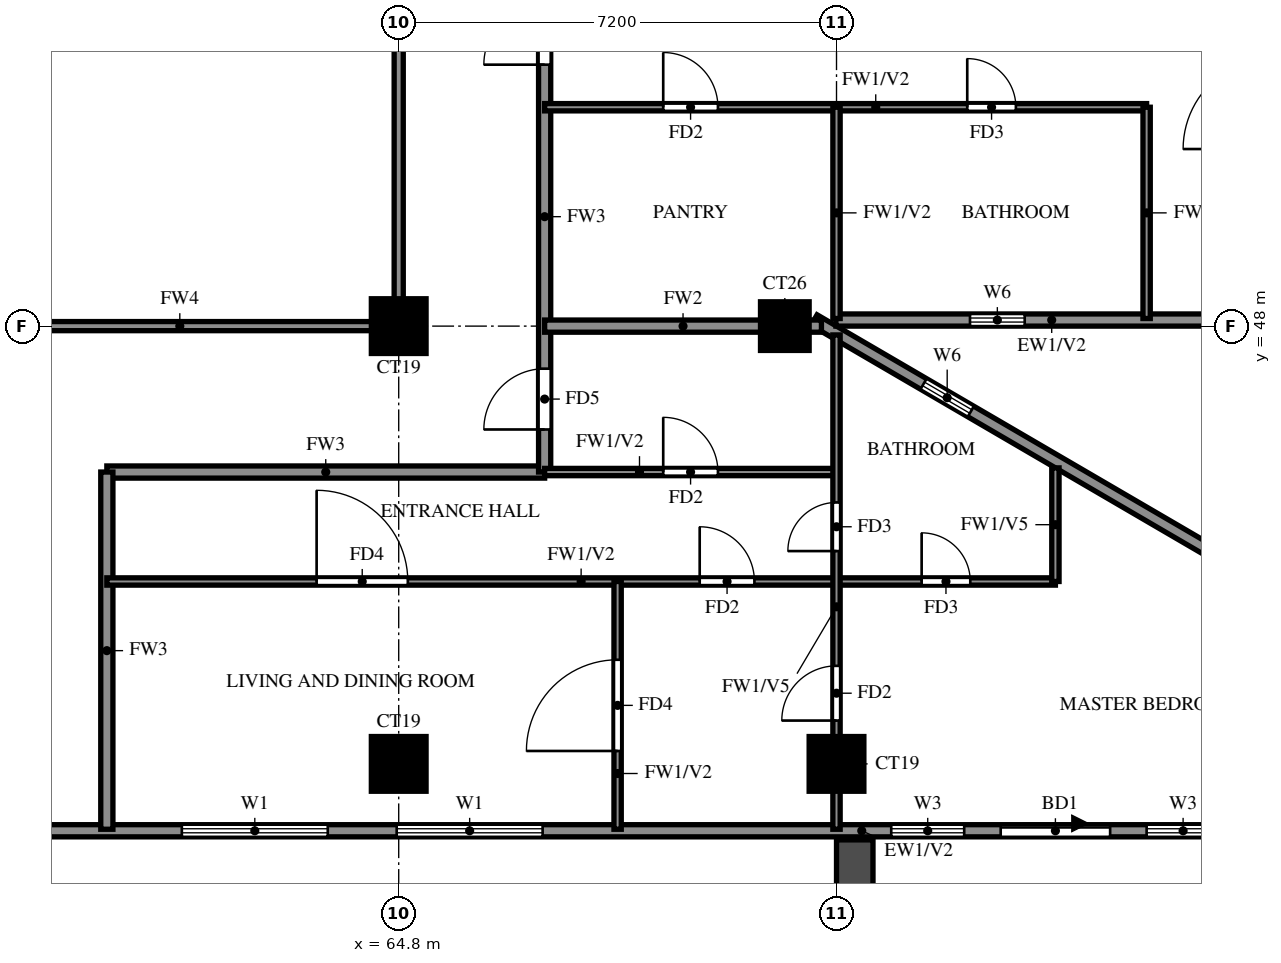
"""IFC4 building model, lengths in metres.
Left out: names, types, materials, properties, quantities, classifications, styles, units other than length and angle.
Written with IfcOpenShell. Run it as: python <this file> out.ifc"""

import sys

from ifc_helpers import new_model, si_unit, direction, frame, frame_2d, origin, origin_2d, place, context, subcontext, project, spatial, rectangle, extrude, source, transform, mapped, element, fill, save


model = new_model("IFC4")
c1 = context("Model", 3, precision=1e-05, world=origin(), true_north=direction((0.0, 1.0)))
c2 = subcontext(c1, "Body", "Model", "MODEL_VIEW")
j1 = project(units=[si_unit("LENGTHUNIT", "METRE"), si_unit("PLANEANGLEUNIT", "RADIAN")], contexts=[c1])
p1 = place(None, origin())
s1 = spatial("IfcSite", under=j1, at=p1, CompositionType="ELEMENT")
p2 = place(p1, origin())
s2 = spatial("IfcBuilding", under=s1, at=p2, CompositionType="ELEMENT")
p3 = place(p2, frame((0.0, 0.0, 178.0)))
s3 = spatial("IfcBuildingStorey", under=s2, at=p3, CompositionType="ELEMENT", Elevation=178.0)
m1 = source(origin(), c2, "Body", "SweptSolid", [
    extrude(rectangle(XDim=0.9, YDim=0.9, at=origin_2d()), origin(), (0.0, 0.0, 1.0), 3.2),
])
for number, where, z_axis, x_axis in (
    (1, (64.8, 40.8, 0.0), (0.0, 0.0, 1.0), (1.0, 0.0, 0.0)),
    (2, (72.0, 40.8, 0.0), (0.0, 0.0, 1.0), (1.0, 0.0, 0.0)),
    (3, (64.8, 48.0, 0.0), (0.0, 0.0, 1.0), (1.0, 0.0, 0.0)),
):
    element("IfcColumn", number, at=place(p3, frame(where, z_axis=z_axis, x_axis=x_axis)), inside=s3, PredefinedType="COLUMN", context=c2, shape_type="MappedRepresentation", body=[
        mapped(m1, transform((0.0, 0.0, 0.0))),
    ])
m2 = source(origin(), c2, "Body", "SweptSolid", [
    extrude(rectangle(XDim=0.8, YDim=0.8, at=origin_2d()), origin(), (0.0, 0.0, 1.0), 3.2),
])
p4 = place(p3, frame((71.15, 48.0, 0.0), z_axis=(0.0, 0.0, 1.0), x_axis=(1.0, 0.0, 0.0)))
e4 = element("IfcColumn", 4, at=p4, inside=s3, PredefinedType="COLUMN", context=c2, shape_type="MappedRepresentation", body=[
    mapped(m2, transform((0.0, 0.0, 0.0))),
])
p5 = place(p3, frame((85.719, 39.881, 0.0), z_axis=(0.0, 0.0, 1.0), x_axis=(-0.86377618652, 0.503875678716, 0.0)))
e5 = element("IfcWall", 5, at=p5, inside=s3, PredefinedType="SOLIDWALL", context=c2, shape_type="SweptSolid", body=[
    extrude(rectangle(XDim=16.311, YDim=0.2, at=frame_2d((8.156, 0.0))), origin(), (0.0, 0.0, 1.0), 3.2),
])
p6 = place(p5, frame((13.326, 0.0, 1.5)))
e6 = element("IfcOpeningElement", 6, at=p6, cuts=e5, PredefinedType="OPENING", context=c2, shape_type="SweptSolid", body=[
    extrude(rectangle(XDim=0.9, YDim=0.9, at=frame_2d((0.45, 0.45))), frame((0.0, 0.11, 0.0), z_axis=(0.0, -1.0, 0.0), x_axis=(1.0, 0.0, 0.0)), (0.0, 0.0, 1.0), 0.22),
])
p7 = place(p3, frame((71.99, 48.1, 0.0), z_axis=(0.0, 0.0, 1.0), x_axis=(1.0, 0.0, 0.0)))
e7 = element("IfcWall", 7, at=p7, inside=s3, PredefinedType="SOLIDWALL", context=c2, shape_type="SweptSolid", body=[
    extrude(rectangle(XDim=6.76, YDim=0.2, at=frame_2d((3.38, 0.0))), origin(), (0.0, 0.0, 1.0), 3.2),
])
p8 = place(p7, frame((2.205, 0.0, 1.5)))
e8 = element("IfcOpeningElement", 8, at=p8, cuts=e7, PredefinedType="OPENING", context=c2, shape_type="SweptSolid", body=[
    extrude(rectangle(XDim=0.9, YDim=0.9, at=frame_2d((0.45, 0.45))), frame((0.0, 0.11, 0.0), z_axis=(0.0, -1.0, 0.0), x_axis=(1.0, 0.0, 0.0)), (0.0, 0.0, 1.0), 0.22),
])
p9 = place(p3, frame((58.8, 39.7, 0.0), z_axis=(0.0, 0.0, 1.0), x_axis=(1.0, 0.0, 0.0)))
e9 = element("IfcWall", 9, at=p9, inside=s3, PredefinedType="SOLIDWALL", context=c2, shape_type="SweptSolid", body=[
    extrude(rectangle(XDim=27.23, YDim=0.2, at=frame_2d((13.615, 0.0))), origin(), (0.0, 0.0, 1.0), 3.2),
])
p10 = place(p9, frame((15.9, 0.0, 0.0)))
e10 = element("IfcOpeningElement", 10, at=p10, cuts=e9, PredefinedType="OPENING", context=c2, shape_type="SweptSolid", body=[
    extrude(rectangle(XDim=1.8, YDim=2.4, at=frame_2d((0.9, 1.2))), frame((0.0, 0.11, 0.0), z_axis=(0.0, -1.0, 0.0), x_axis=(1.0, 0.0, 0.0)), (0.0, 0.0, 1.0), 0.22),
])
p11 = place(p9, frame((2.433, 0.0, 0.6)))
e11 = element("IfcOpeningElement", 11, at=p11, cuts=e9, PredefinedType="OPENING", context=c2, shape_type="SweptSolid", body=[
    extrude(rectangle(XDim=2.4, YDim=2.4, at=frame_2d((1.2, 1.2))), frame((0.0, 0.11, 0.0), z_axis=(0.0, -1.0, 0.0), x_axis=(1.0, 0.0, 0.0)), (0.0, 0.0, 1.0), 0.22),
])
p12 = place(p9, frame((5.967, 0.0, 0.6)))
e12 = element("IfcOpeningElement", 12, at=p12, cuts=e9, PredefinedType="OPENING", context=c2, shape_type="SweptSolid", body=[
    extrude(rectangle(XDim=2.4, YDim=2.4, at=frame_2d((1.2, 1.2))), frame((0.0, 0.11, 0.0), z_axis=(0.0, -1.0, 0.0), x_axis=(1.0, 0.0, 0.0)), (0.0, 0.0, 1.0), 0.22),
])
p13 = place(p9, frame((14.1, 0.0, 0.6)))
e13 = element("IfcOpeningElement", 13, at=p13, cuts=e9, PredefinedType="OPENING", context=c2, shape_type="SweptSolid", body=[
    extrude(rectangle(XDim=1.2, YDim=2.4, at=frame_2d((0.6, 1.2))), frame((0.0, 0.11, 0.0), z_axis=(0.0, -1.0, 0.0), x_axis=(1.0, 0.0, 0.0)), (0.0, 0.0, 1.0), 0.22),
])
p14 = place(p9, frame((18.3, 0.0, 0.6)))
e14 = element("IfcOpeningElement", 14, at=p14, cuts=e9, PredefinedType="OPENING", context=c2, shape_type="SweptSolid", body=[
    extrude(rectangle(XDim=1.2, YDim=2.4, at=frame_2d((0.6, 1.2))), frame((0.0, 0.11, 0.0), z_axis=(0.0, -1.0, 0.0), x_axis=(1.0, 0.0, 0.0)), (0.0, 0.0, 1.0), 0.22),
])
p15 = place(p9, frame((21.563, 0.0, 0.6)))
e15 = element("IfcOpeningElement", 15, at=p15, cuts=e9, PredefinedType="OPENING", context=c2, shape_type="SweptSolid", body=[
    extrude(rectangle(XDim=2.4, YDim=2.4, at=frame_2d((1.2, 1.2))), frame((0.0, 0.11, 0.0), z_axis=(0.0, -1.0, 0.0), x_axis=(1.0, 0.0, 0.0)), (0.0, 0.0, 1.0), 0.22),
])
p16 = place(p9, frame((25.978, 0.0, 0.6)))
e16 = element("IfcOpeningElement", 16, at=p16, cuts=e9, PredefinedType="OPENING", context=c2, shape_type="SweptSolid", body=[
    extrude(rectangle(XDim=0.9, YDim=2.4, at=frame_2d((0.45, 1.2))), frame((0.0, 0.11, 0.0), z_axis=(0.0, -1.0, 0.0), x_axis=(1.0, 0.0, 0.0)), (0.0, 0.0, 1.0), 0.22),
])
p17 = place(p3, frame((72.3, 39.55, 0.0), z_axis=(0.0, 0.0, 1.0), x_axis=(0.0, -1.0, 0.0)))
e17 = element("IfcWall", 17, at=p17, inside=s3, PredefinedType="SOLIDWALL", context=c2, shape_type="SweptSolid", body=[
    extrude(rectangle(XDim=2.65, YDim=0.6, at=frame_2d((1.325, 0.0))), origin(), (0.0, 0.0, 1.0), 2.85),
])
p18 = place(p3, frame((60.0, 45.6, 0.0), z_axis=(0.0, 0.0, 1.0), x_axis=(1.0, 0.0, 0.0)))
e18 = element("IfcWall", 18, at=p18, inside=s3, PredefinedType="SOLIDWALL", context=c2, shape_type="SweptSolid", body=[
    extrude(rectangle(XDim=7.2, YDim=0.2, at=frame_2d((3.6, 0.0))), origin(), (0.0, 0.0, 1.0), 3.2),
])
p19 = place(p3, frame((60.0, 39.725, 0.0), z_axis=(0.0, 0.0, 1.0), x_axis=(0.0, 1.0, 0.0)))
e19 = element("IfcWall", 19, at=p19, inside=s3, PredefinedType="SOLIDWALL", context=c2, shape_type="SweptSolid", body=[
    extrude(rectangle(XDim=5.875, YDim=0.2, at=frame_2d((2.938, 0.0))), origin(), (0.0, 0.0, 1.0), 3.2),
])
p20 = place(p3, frame((67.2, 45.6, 0.0), z_axis=(0.0, 0.0, 1.0), x_axis=(0.0, 1.0, 0.0)))
e20 = element("IfcWall", 20, at=p20, inside=s3, PredefinedType="SOLIDWALL", context=c2, shape_type="SweptSolid", body=[
    extrude(rectangle(XDim=8.4, YDim=0.2, at=frame_2d((4.2, 0.0))), origin(), (0.0, 0.0, 1.0), 3.2),
])
p21 = place(p20, frame((6.7, 0.0, 0.0)))
e21 = element("IfcOpeningElement", 21, at=p21, cuts=e20, PredefinedType="OPENING", context=c2, shape_type="SweptSolid", body=[
    extrude(rectangle(XDim=1.0, YDim=2.1, at=frame_2d((0.5, 1.05))), frame((0.0, 0.11, 0.0), z_axis=(0.0, -1.0, 0.0), x_axis=(1.0, 0.0, 0.0)), (0.0, 0.0, 1.0), 0.22),
])
p22 = place(p20, frame((0.7, 0.0, 0.0)))
e22 = element("IfcOpeningElement", 22, at=p22, cuts=e20, PredefinedType="OPENING", context=c2, shape_type="SweptSolid", body=[
    extrude(rectangle(XDim=1.0, YDim=2.1, at=frame_2d((0.5, 1.05))), frame((0.0, 0.11, 0.0), z_axis=(0.0, -1.0, 0.0), x_axis=(1.0, 0.0, 0.0)), (0.0, 0.0, 1.0), 0.22),
])
p23 = place(p3, frame((67.2, 48.0, 0.0), z_axis=(0.0, 0.0, 1.0), x_axis=(1.0, 0.0, 0.0)))
e23 = element("IfcWall", 23, at=p23, inside=s3, PredefinedType="SOLIDWALL", context=c2, shape_type="SweptSolid", body=[
    extrude(rectangle(XDim=4.552, YDim=0.2, at=frame_2d((2.276, 0.0))), origin(), (0.0, 0.0, 1.0), 3.2),
])
p24 = place(p3, frame((60.0, 43.8, 0.0), z_axis=(0.0, 0.0, 1.0), x_axis=(1.0, 0.0, 0.0)))
e24 = element("IfcWall", 24, at=p24, inside=s3, PredefinedType="PARTITIONING", context=c2, shape_type="SweptSolid", body=[
    extrude(rectangle(XDim=15.6, YDim=0.12, at=frame_2d((7.8, 0.0))), origin(), (0.0, 0.0, 1.0), 3.2),
])
p25 = place(p24, frame((9.75, 0.0, 0.0)))
e25 = element("IfcOpeningElement", 25, at=p25, cuts=e24, PredefinedType="OPENING", context=c2, shape_type="SweptSolid", body=[
    extrude(rectangle(XDim=0.9, YDim=2.1, at=frame_2d((0.45, 1.05))), frame((0.0, 0.07, 0.0), z_axis=(0.0, -1.0, 0.0), x_axis=(1.0, 0.0, 0.0)), (0.0, 0.0, 1.0), 0.14),
])
p26 = place(p24, frame((3.45, 0.0, 0.0)))
e26 = element("IfcOpeningElement", 26, at=p26, cuts=e24, PredefinedType="OPENING", context=c2, shape_type="SweptSolid", body=[
    extrude(rectangle(XDim=1.5, YDim=2.1, at=frame_2d((0.75, 1.05))), frame((0.0, 0.07, 0.0), z_axis=(0.0, -1.0, 0.0), x_axis=(1.0, 0.0, 0.0)), (0.0, 0.0, 1.0), 0.14),
])
p27 = place(p24, frame((13.4, 0.0, 0.0)))
e27 = element("IfcOpeningElement", 27, at=p27, cuts=e24, PredefinedType="OPENING", context=c2, shape_type="SweptSolid", body=[
    extrude(rectangle(XDim=0.8, YDim=2.1, at=frame_2d((0.4, 1.05))), frame((0.0, 0.07, 0.0), z_axis=(0.0, -1.0, 0.0), x_axis=(1.0, 0.0, 0.0)), (0.0, 0.0, 1.0), 0.14),
])
p28 = place(p3, frame((67.2, 45.6, 0.0), z_axis=(0.0, 0.0, 1.0), x_axis=(1.0, 0.0, 0.0)))
e28 = element("IfcWall", 28, at=p28, inside=s3, PredefinedType="PARTITIONING", context=c2, shape_type="SweptSolid", body=[
    extrude(rectangle(XDim=4.8, YDim=0.12, at=frame_2d((2.4, 0.0))), origin(), (0.0, 0.0, 1.0), 3.2),
])
p29 = place(p28, frame((1.95, 0.0, 0.0)))
e29 = element("IfcOpeningElement", 29, at=p29, cuts=e28, PredefinedType="OPENING", context=c2, shape_type="SweptSolid", body=[
    extrude(rectangle(XDim=0.9, YDim=2.1, at=frame_2d((0.45, 1.05))), frame((0.0, 0.07, 0.0), z_axis=(0.0, -1.0, 0.0), x_axis=(1.0, 0.0, 0.0)), (0.0, 0.0, 1.0), 0.14),
])
p30 = place(p3, frame((67.2, 51.6, 0.0), z_axis=(0.0, 0.0, 1.0), x_axis=(1.0, 0.0, 0.0)))
e30 = element("IfcWall", 30, at=p30, inside=s3, PredefinedType="PARTITIONING", context=c2, shape_type="SweptSolid", body=[
    extrude(rectangle(XDim=9.9, YDim=0.12, at=frame_2d((4.95, 0.0))), origin(), (0.0, 0.0, 1.0), 3.2),
])
p31 = place(p30, frame((6.95, 0.0, 0.0)))
e31 = element("IfcOpeningElement", 31, at=p31, cuts=e30, PredefinedType="OPENING", context=c2, shape_type="SweptSolid", body=[
    extrude(rectangle(XDim=0.8, YDim=2.1, at=frame_2d((0.4, 1.05))), frame((0.0, 0.07, 0.0), z_axis=(0.0, -1.0, 0.0), x_axis=(1.0, 0.0, 0.0)), (0.0, 0.0, 1.0), 0.14),
])
p32 = place(p30, frame((1.95, 0.0, 0.0)))
e32 = element("IfcOpeningElement", 32, at=p32, cuts=e30, PredefinedType="OPENING", context=c2, shape_type="SweptSolid", body=[
    extrude(rectangle(XDim=0.9, YDim=2.1, at=frame_2d((0.45, 1.05))), frame((0.0, 0.07, 0.0), z_axis=(0.0, -1.0, 0.0), x_axis=(1.0, 0.0, 0.0)), (0.0, 0.0, 1.0), 0.14),
])
p33 = place(p3, frame((68.4, 39.725, 0.0), z_axis=(0.0, 0.0, 1.0), x_axis=(0.0, 1.0, 0.0)))
e33 = element("IfcWall", 33, at=p33, inside=s3, PredefinedType="PARTITIONING", context=c2, shape_type="SweptSolid", body=[
    extrude(rectangle(XDim=4.075, YDim=0.12, at=frame_2d((2.038, 0.0))), origin(), (0.0, 0.0, 1.0), 3.2),
])
p34 = place(p33, frame((1.288, 0.0, 0.0)))
e34 = element("IfcOpeningElement", 34, at=p34, cuts=e33, PredefinedType="OPENING", context=c2, shape_type="SweptSolid", body=[
    extrude(rectangle(XDim=1.5, YDim=2.1, at=frame_2d((0.75, 1.05))), frame((0.0, 0.07, 0.0), z_axis=(0.0, -1.0, 0.0), x_axis=(1.0, 0.0, 0.0)), (0.0, 0.0, 1.0), 0.14),
])
p35 = place(p3, frame((72.0, 39.725, 0.0), z_axis=(0.0, 0.0, 1.0), x_axis=(0.0, 1.0, 0.0)))
e35 = element("IfcWall", 35, at=p35, inside=s3, PredefinedType="PARTITIONING", context=c2, shape_type="SweptSolid", body=[
    extrude(rectangle(XDim=8.13, YDim=0.12, at=frame_2d((4.065, 0.0))), origin(), (0.0, 0.0, 1.0), 2.3),
])
p36 = place(p35, frame((1.788, 0.0, 0.0)))
e36 = element("IfcOpeningElement", 36, at=p36, cuts=e35, PredefinedType="OPENING", context=c2, shape_type="SweptSolid", body=[
    extrude(rectangle(XDim=0.9, YDim=2.1, at=frame_2d((0.45, 1.05))), frame((0.0, 0.07, 0.0), z_axis=(0.0, -1.0, 0.0), x_axis=(1.0, 0.0, 0.0)), (0.0, 0.0, 1.0), 0.14),
])
p37 = place(p35, frame((4.575, 0.0, 0.0)))
e37 = element("IfcOpeningElement", 37, at=p37, cuts=e35, PredefinedType="OPENING", context=c2, shape_type="SweptSolid", body=[
    extrude(rectangle(XDim=0.8, YDim=2.1, at=frame_2d((0.4, 1.05))), frame((0.0, 0.07, 0.0), z_axis=(0.0, -1.0, 0.0), x_axis=(1.0, 0.0, 0.0)), (0.0, 0.0, 1.0), 0.14),
])
p38 = place(p3, frame((72.0, 48.125, 0.0), z_axis=(0.0, 0.0, 1.0), x_axis=(0.0, 1.0, 0.0)))
e38 = element("IfcWall", 38, at=p38, inside=s3, PredefinedType="PARTITIONING", context=c2, shape_type="SweptSolid", body=[
    extrude(rectangle(XDim=3.475, YDim=0.12, at=frame_2d((1.738, 0.0))), origin(), (0.0, 0.0, 1.0), 3.2),
])
p39 = place(p3, frame((75.6, 43.8, 0.0), z_axis=(0.0, 0.0, 1.0), x_axis=(0.0, 1.0, 0.0)))
e39 = element("IfcWall", 39, at=p39, inside=s3, PredefinedType="PARTITIONING", context=c2, shape_type="SweptSolid", body=[
    extrude(rectangle(XDim=1.868, YDim=0.12, at=frame_2d((0.934, 0.0))), origin(), (0.0, 0.0, 1.0), 2.3),
])
p40 = place(p3, frame((77.1, 48.125, 0.0), z_axis=(0.0, 0.0, 1.0), x_axis=(0.0, 1.0, 0.0)))
e40 = element("IfcWall", 40, at=p40, inside=s3, PredefinedType="PARTITIONING", context=c2, shape_type="SweptSolid", body=[
    extrude(rectangle(XDim=3.475, YDim=0.12, at=frame_2d((1.738, 0.0))), origin(), (0.0, 0.0, 1.0), 3.2),
])
p41 = place(p3, frame((57.6, 48.0, 0.0), z_axis=(0.0, 0.0, 1.0), x_axis=(1.0, 0.0, 0.0)))
e41 = element("IfcWall", 41, at=p41, inside=s3, PredefinedType="SOLIDWALL", context=c2, shape_type="SweptSolid", body=[
    extrude(rectangle(XDim=7.2, YDim=0.15, at=frame_2d((3.6, 0.0))), origin(), (0.0, 0.0, 1.0), 2.3),
])
p42 = place(p3, frame((64.8, 48.0, 0.0), z_axis=(0.0, 0.0, 1.0), x_axis=(0.0, 1.0, 0.0)))
e42 = element("IfcWall", 42, at=p42, inside=s3, PredefinedType="SOLIDWALL", context=c2, shape_type="SweptSolid", body=[
    extrude(rectangle(XDim=14.4, YDim=0.15, at=frame_2d((7.2, 0.0))), origin(), (0.0, 0.0, 1.0), 2.3),
])
p43 = place(p6, origin())
e43 = element("IfcWindow", 43, at=p43, inside=s3, PartitioningType="SINGLE_PANEL", PredefinedType="WINDOW", context=c2, shape_type="SweptSolid", body=[
    extrude(rectangle(XDim=0.9, YDim=0.9, at=frame_2d((0.45, 0.45))), frame((0.0, 0.03, 0.0), z_axis=(0.0, -1.0, 0.0), x_axis=(1.0, 0.0, 0.0)), (0.0, 0.0, 1.0), 0.06),
])
fill(e6, e43)
p44 = place(p8, origin())
e44 = element("IfcWindow", 44, at=p44, inside=s3, PartitioningType="SINGLE_PANEL", PredefinedType="WINDOW", context=c2, shape_type="SweptSolid", body=[
    extrude(rectangle(XDim=0.9, YDim=0.9, at=frame_2d((0.45, 0.45))), frame((0.0, 0.03, 0.0), z_axis=(0.0, -1.0, 0.0), x_axis=(1.0, 0.0, 0.0)), (0.0, 0.0, 1.0), 0.06),
])
fill(e8, e44)
p45 = place(p10, origin())
e45 = element("IfcDoor", 45, at=p45, inside=s3, OperationType="DOUBLE_DOOR_SLIDING", PredefinedType="DOOR", context=c2, shape_type="SweptSolid", body=[
    extrude(rectangle(XDim=1.8, YDim=2.4, at=frame_2d((0.9, 1.2))), frame((0.0, 0.025, 0.0), z_axis=(0.0, -1.0, 0.0), x_axis=(1.0, 0.0, 0.0)), (0.0, 0.0, 1.0), 0.05),
])
fill(e10, e45)
p46 = place(p11, origin())
e46 = element("IfcWindow", 46, at=p46, inside=s3, PartitioningType="DOUBLE_PANEL_VERTICAL", PredefinedType="WINDOW", context=c2, shape_type="SweptSolid", body=[
    extrude(rectangle(XDim=2.4, YDim=2.4, at=frame_2d((1.2, 1.2))), frame((0.0, 0.03, 0.0), z_axis=(0.0, -1.0, 0.0), x_axis=(1.0, 0.0, 0.0)), (0.0, 0.0, 1.0), 0.06),
])
fill(e11, e46)
p47 = place(p12, origin())
e47 = element("IfcWindow", 47, at=p47, inside=s3, PartitioningType="DOUBLE_PANEL_VERTICAL", PredefinedType="WINDOW", context=c2, shape_type="SweptSolid", body=[
    extrude(rectangle(XDim=2.4, YDim=2.4, at=frame_2d((1.2, 1.2))), frame((0.0, 0.03, 0.0), z_axis=(0.0, -1.0, 0.0), x_axis=(1.0, 0.0, 0.0)), (0.0, 0.0, 1.0), 0.06),
])
fill(e12, e47)
p48 = place(p13, origin())
e48 = element("IfcWindow", 48, at=p48, inside=s3, PartitioningType="SINGLE_PANEL", PredefinedType="WINDOW", context=c2, shape_type="SweptSolid", body=[
    extrude(rectangle(XDim=1.2, YDim=2.4, at=frame_2d((0.6, 1.2))), frame((0.0, 0.03, 0.0), z_axis=(0.0, -1.0, 0.0), x_axis=(1.0, 0.0, 0.0)), (0.0, 0.0, 1.0), 0.06),
])
fill(e13, e48)
p49 = place(p14, origin())
e49 = element("IfcWindow", 49, at=p49, inside=s3, PartitioningType="SINGLE_PANEL", PredefinedType="WINDOW", context=c2, shape_type="SweptSolid", body=[
    extrude(rectangle(XDim=1.2, YDim=2.4, at=frame_2d((0.6, 1.2))), frame((0.0, 0.03, 0.0), z_axis=(0.0, -1.0, 0.0), x_axis=(1.0, 0.0, 0.0)), (0.0, 0.0, 1.0), 0.06),
])
fill(e14, e49)
p50 = place(p21, origin())
e50 = element("IfcDoor", 50, at=p50, inside=s3, OperationType="SINGLE_SWING_RIGHT", PredefinedType="DOOR", context=c2, shape_type="SweptSolid", body=[
    extrude(rectangle(XDim=1.0, YDim=2.1, at=frame_2d((0.5, 1.05))), frame((0.0, 0.025, 0.0), z_axis=(0.0, -1.0, 0.0), x_axis=(1.0, 0.0, 0.0)), (0.0, 0.0, 1.0), 0.05),
])
fill(e21, e50)
p51 = place(p31, origin())
e51 = element("IfcDoor", 51, at=p51, inside=s3, OperationType="SINGLE_SWING_RIGHT", PredefinedType="DOOR", context=c2, shape_type="SweptSolid", body=[
    extrude(rectangle(XDim=0.8, YDim=2.1, at=frame_2d((0.4, 1.05))), frame((0.0, 0.025, 0.0), z_axis=(0.0, -1.0, 0.0), x_axis=(1.0, 0.0, 0.0)), (0.0, 0.0, 1.0), 0.05),
])
fill(e31, e51)
p52 = place(p32, origin())
e52 = element("IfcDoor", 52, at=p52, inside=s3, OperationType="SINGLE_SWING_LEFT", PredefinedType="DOOR", context=c2, shape_type="SweptSolid", body=[
    extrude(rectangle(XDim=0.9, YDim=2.1, at=frame_2d((0.45, 1.05))), frame((0.0, 0.025, 0.0), z_axis=(0.0, -1.0, 0.0), x_axis=(1.0, 0.0, 0.0)), (0.0, 0.0, 1.0), 0.05),
])
fill(e32, e52)
p53 = place(p34, origin())
e53 = element("IfcDoor", 53, at=p53, inside=s3, OperationType="SINGLE_SWING_LEFT", PredefinedType="DOOR", context=c2, shape_type="SweptSolid", body=[
    extrude(rectangle(XDim=1.5, YDim=2.1, at=frame_2d((0.75, 1.05))), frame((0.0, 0.025, 0.0), z_axis=(0.0, -1.0, 0.0), x_axis=(1.0, 0.0, 0.0)), (0.0, 0.0, 1.0), 0.05),
])
fill(e34, e53)
p54 = place(p29, origin())
e54 = element("IfcDoor", 54, at=p54, inside=s3, OperationType="SINGLE_SWING_LEFT", PredefinedType="DOOR", context=c2, shape_type="SweptSolid", body=[
    extrude(rectangle(XDim=0.9, YDim=2.1, at=frame_2d((0.45, 1.05))), frame((0.0, 0.025, 0.0), z_axis=(0.0, -1.0, 0.0), x_axis=(1.0, 0.0, 0.0)), (0.0, 0.0, 1.0), 0.05),
])
fill(e29, e54)
p55 = place(p22, origin())
e55 = element("IfcDoor", 55, at=p55, inside=s3, OperationType="SINGLE_SWING_RIGHT", PredefinedType="DOOR", context=c2, shape_type="SweptSolid", body=[
    extrude(rectangle(XDim=1.0, YDim=2.1, at=frame_2d((0.5, 1.05))), frame((0.0, 0.025, 0.0), z_axis=(0.0, -1.0, 0.0), x_axis=(1.0, 0.0, 0.0)), (0.0, 0.0, 1.0), 0.05),
])
fill(e22, e55)
p56 = place(p25, origin())
e56 = element("IfcDoor", 56, at=p56, inside=s3, OperationType="SINGLE_SWING_LEFT", PredefinedType="DOOR", context=c2, shape_type="SweptSolid", body=[
    extrude(rectangle(XDim=0.9, YDim=2.1, at=frame_2d((0.45, 1.05))), frame((0.0, 0.025, 0.0), z_axis=(0.0, -1.0, 0.0), x_axis=(1.0, 0.0, 0.0)), (0.0, 0.0, 1.0), 0.05),
])
fill(e25, e56)
p57 = place(p26, origin())
e57 = element("IfcDoor", 57, at=p57, inside=s3, OperationType="SINGLE_SWING_LEFT", PredefinedType="DOOR", context=c2, shape_type="SweptSolid", body=[
    extrude(rectangle(XDim=1.5, YDim=2.1, at=frame_2d((0.75, 1.05))), frame((0.0, 0.025, 0.0), z_axis=(0.0, -1.0, 0.0), x_axis=(1.0, 0.0, 0.0)), (0.0, 0.0, 1.0), 0.05),
])
fill(e26, e57)
p58 = place(p36, origin())
e58 = element("IfcDoor", 58, at=p58, inside=s3, OperationType="SINGLE_SWING_LEFT", PredefinedType="DOOR", context=c2, shape_type="SweptSolid", body=[
    extrude(rectangle(XDim=0.9, YDim=2.1, at=frame_2d((0.45, 1.05))), frame((0.0, 0.025, 0.0), z_axis=(0.0, -1.0, 0.0), x_axis=(1.0, 0.0, 0.0)), (0.0, 0.0, 1.0), 0.05),
])
fill(e36, e58)
p59 = place(p37, origin())
e59 = element("IfcDoor", 59, at=p59, inside=s3, OperationType="SINGLE_SWING_LEFT", PredefinedType="DOOR", context=c2, shape_type="SweptSolid", body=[
    extrude(rectangle(XDim=0.8, YDim=2.1, at=frame_2d((0.4, 1.05))), frame((0.0, 0.025, 0.0), z_axis=(0.0, -1.0, 0.0), x_axis=(1.0, 0.0, 0.0)), (0.0, 0.0, 1.0), 0.05),
])
fill(e37, e59)
p60 = place(p27, origin())
e60 = element("IfcDoor", 60, at=p60, inside=s3, OperationType="SINGLE_SWING_LEFT", PredefinedType="DOOR", context=c2, shape_type="SweptSolid", body=[
    extrude(rectangle(XDim=0.8, YDim=2.1, at=frame_2d((0.4, 1.05))), frame((0.0, 0.025, 0.0), z_axis=(0.0, -1.0, 0.0), x_axis=(1.0, 0.0, 0.0)), (0.0, 0.0, 1.0), 0.05),
])
fill(e27, e60)
save(model, sys.argv[1])
